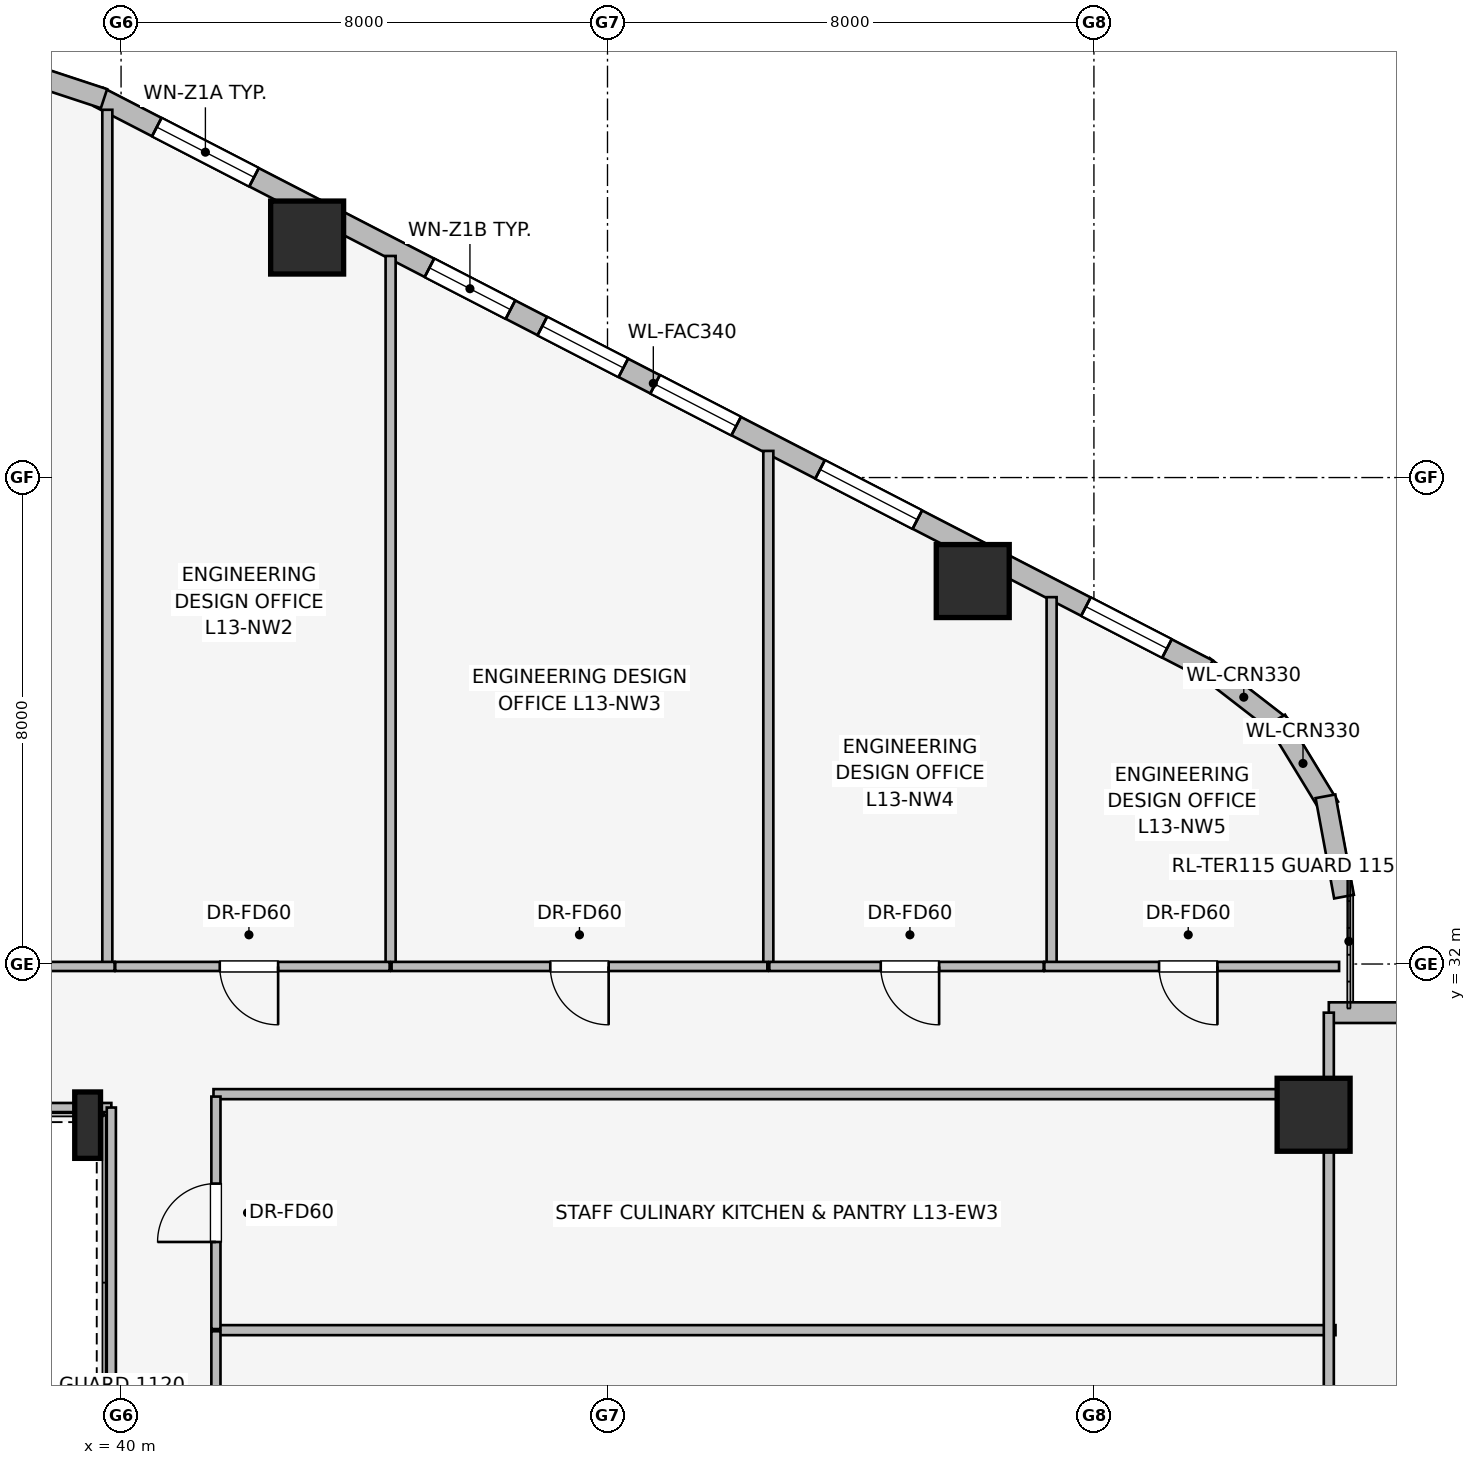
"""IFC4 building model, lengths in metres.
Left out: names, types, materials, properties, quantities, classifications, styles, units other than length and angle.
Written with IfcOpenShell. Run it as: python <this file> out.ifc"""

import sys

from ifc_helpers import new_model, si_unit, direction, frame, frame_2d, origin, origin_2d, place, context, subcontext, project, spatial, rectangle, i_section, extrude, element, fill, save


model = new_model("IFC4")
c1 = context("Model", 3, precision=1e-05, world=origin(), true_north=direction((0.0, 1.0)))
c2 = subcontext(c1, "Body", "Model", "MODEL_VIEW")
j1 = project(units=[si_unit("LENGTHUNIT", "METRE"), si_unit("PLANEANGLEUNIT", "RADIAN")], contexts=[c1])
p1 = place(None, origin())
s1 = spatial("IfcSite", under=j1, at=p1, CompositionType="ELEMENT")
p2 = place(p1, origin())
s2 = spatial("IfcBuilding", under=s1, at=p2, CompositionType="ELEMENT")
p3 = place(p2, frame((0.0, 0.0, 52.55)))
s3 = spatial("IfcBuildingStorey", under=s2, at=p3, CompositionType="ELEMENT", Elevation=52.55)
for number, where, z_axis, x_axis in (
    (1, (54.007, 38.298, 0.0), (0.0, 0.0, 1.0), (1.0, 0.0, 0.0)),
    (2, (43.06, 43.947, 0.0), (0.0, 0.0, 1.0), (1.0, 0.0, 0.0)),
    (3, (59.613, 29.521, 0.0), (0.0, 0.0, 1.0), (1.0, 0.0, 0.0)),
):
    element("IfcColumn", number, at=place(p3, frame(where, z_axis=z_axis, x_axis=x_axis)), inside=s3, PredefinedType="COLUMN", context=c2, shape_type="SweptSolid", body=[
        extrude(rectangle(XDim=1.2, YDim=1.2, at=origin_2d()), origin(), (0.0, 0.0, 1.0), 3.65),
    ])
p4 = place(p3, frame((39.45, 29.35, 0.0), z_axis=(0.0, 0.0, 1.0), x_axis=(1.0, 0.0, 0.0)))
e4 = element("IfcColumn", 4, at=p4, inside=s3, PredefinedType="COLUMN", context=c2, shape_type="SweptSolid", body=[
    extrude(i_section(OverallWidth=0.424, OverallDepth=1.092, WebThickness=0.045, FlangeThickness=0.082, at=origin_2d()), origin(), (0.0, 0.0, 1.0), 3.65),
])
p5 = place(p3, frame((57.802, 36.901, 0.0), z_axis=(0.0, 0.0, 1.0), x_axis=(0.790691856293, -0.61221433207, 0.0)))
e5 = element("IfcWall", 5, at=p5, inside=s3, PredefinedType="STANDARD", context=c2, shape_type="SweptSolid", body=[
    extrude(rectangle(XDim=1.676, YDim=0.33, at=frame_2d((0.838, 0.0))), origin(), (0.0, 0.0, 1.0), 3.36),
])
p6 = place(p3, frame((59.002, 36.015, 0.0), z_axis=(0.0, 0.0, 1.0), x_axis=(0.520584129191, -0.853810379671, 0.0)))
e6 = element("IfcWall", 6, at=p6, inside=s3, PredefinedType="STANDARD", context=c2, shape_type="SweptSolid", body=[
    extrude(rectangle(XDim=1.677, YDim=0.33, at=frame_2d((0.838, 0.0))), origin(), (0.0, 0.0, 1.0), 3.36),
])
p7 = place(p3, frame((59.808, 34.758, 0.0), z_axis=(0.0, 0.0, 1.0), x_axis=(0.181714143354, -0.983351397063, 0.0)))
e7 = element("IfcWall", 7, at=p7, inside=s3, PredefinedType="STANDARD", context=c2, shape_type="SweptSolid", body=[
    extrude(rectangle(XDim=1.678, YDim=0.33, at=frame_2d((0.839, 0.0))), origin(), (0.0, 0.0, 1.0), 3.36),
])
p8 = place(p3, frame((39.631, 46.257, 0.0), z_axis=(0.0, 0.0, 1.0), x_axis=(0.888634413993, -0.458616264721, 0.0)))
e8 = element("IfcWall", 8, at=p8, inside=s3, PredefinedType="STANDARD", context=c2, shape_type="SweptSolid", body=[
    extrude(rectangle(XDim=20.531, YDim=0.34, at=frame_2d((10.266, 0.0))), origin(), (0.0, 0.0, 1.0), 2.654),
])
p9 = place(p8, frame((1.076, 0.0, 0.75)))
e9 = element("IfcOpeningElement", 9, at=p9, cuts=e8, PredefinedType="OPENING", context=c2, shape_type="SweptSolid", body=[
    extrude(rectangle(XDim=1.8, YDim=1.5, at=frame_2d((0.9, 0.75))), frame((0.0, 0.18, 0.0), z_axis=(0.0, -1.0, 0.0), x_axis=(1.0, 0.0, 0.0)), (0.0, 0.0, 1.0), 0.36),
])
p10 = place(p8, frame((6.122, 0.0, 0.75)))
e10 = element("IfcOpeningElement", 10, at=p10, cuts=e8, PredefinedType="OPENING", context=c2, shape_type="SweptSolid", body=[
    extrude(rectangle(XDim=1.5, YDim=1.5, at=frame_2d((0.75, 0.75))), frame((0.0, 0.18, 0.0), z_axis=(0.0, -1.0, 0.0), x_axis=(1.0, 0.0, 0.0)), (0.0, 0.0, 1.0), 0.36),
])
p11 = place(p8, frame((8.211, 0.0, 0.75)))
e11 = element("IfcOpeningElement", 11, at=p11, cuts=e8, PredefinedType="OPENING", context=c2, shape_type="SweptSolid", body=[
    extrude(rectangle(XDim=1.5, YDim=1.5, at=frame_2d((0.75, 0.75))), frame((0.0, 0.18, 0.0), z_axis=(0.0, -1.0, 0.0), x_axis=(1.0, 0.0, 0.0)), (0.0, 0.0, 1.0), 0.36),
])
p12 = place(p8, frame((10.299, 0.0, 0.75)))
e12 = element("IfcOpeningElement", 12, at=p12, cuts=e8, PredefinedType="OPENING", context=c2, shape_type="SweptSolid", body=[
    extrude(rectangle(XDim=1.5, YDim=1.5, at=frame_2d((0.75, 0.75))), frame((0.0, 0.18, 0.0), z_axis=(0.0, -1.0, 0.0), x_axis=(1.0, 0.0, 0.0)), (0.0, 0.0, 1.0), 0.36),
])
p13 = place(p8, frame((13.352, 0.0, 0.75)))
e13 = element("IfcOpeningElement", 13, at=p13, cuts=e8, PredefinedType="OPENING", context=c2, shape_type="SweptSolid", body=[
    extrude(rectangle(XDim=1.8, YDim=1.5, at=frame_2d((0.9, 0.75))), frame((0.0, 0.18, 0.0), z_axis=(0.0, -1.0, 0.0), x_axis=(1.0, 0.0, 0.0)), (0.0, 0.0, 1.0), 0.36),
])
p14 = place(p8, frame((18.272, 0.0, 0.75)))
e14 = element("IfcOpeningElement", 14, at=p14, cuts=e8, PredefinedType="OPENING", context=c2, shape_type="SweptSolid", body=[
    extrude(rectangle(XDim=1.5, YDim=1.5, at=frame_2d((0.75, 0.75))), frame((0.0, 0.18, 0.0), z_axis=(0.0, -1.0, 0.0), x_axis=(1.0, 0.0, 0.0)), (0.0, 0.0, 1.0), 0.36),
])
p15 = place(p3, frame((38.083, 46.77, 0.0), z_axis=(0.0, 0.0, 1.0), x_axis=(0.94976901097, -0.312951794691, 0.0)))
e15 = element("IfcWall", 15, at=p15, inside=s3, PredefinedType="STANDARD", context=c2, shape_type="SweptSolid", body=[
    extrude(rectangle(XDim=1.722, YDim=0.33, at=frame_2d((0.861, 0.0))), origin(), (0.0, 0.0, 1.0), 3.36),
])
p16 = place(p3, frame((59.863, 31.2, 0.0), z_axis=(0.0, 0.0, 1.0), x_axis=(1.0, 0.0, 0.0)))
e16 = element("IfcWall", 16, at=p16, inside=s3, PredefinedType="STANDARD", context=c2, shape_type="SweptSolid", body=[
    extrude(rectangle(XDim=19.0, YDim=0.34, at=frame_2d((9.5, 0.0))), origin(), (0.0, 0.0, 1.0), 3.36),
])
p17 = place(p16, frame((2.633, 0.0, 0.75)))
e17 = element("IfcOpeningElement", 17, at=p17, cuts=e16, PredefinedType="OPENING", context=c2, shape_type="SweptSolid", body=[
    extrude(rectangle(XDim=1.8, YDim=1.5, at=frame_2d((0.9, 0.75))), frame((0.0, 0.18, 0.0), z_axis=(0.0, -1.0, 0.0), x_axis=(1.0, 0.0, 0.0)), (0.0, 0.0, 1.0), 0.36),
])
p18 = place(p16, frame((8.6, 0.0, 0.75)))
e18 = element("IfcOpeningElement", 18, at=p18, cuts=e16, PredefinedType="OPENING", context=c2, shape_type="SweptSolid", body=[
    extrude(rectangle(XDim=1.8, YDim=1.5, at=frame_2d((0.9, 0.75))), frame((0.0, 0.18, 0.0), z_axis=(0.0, -1.0, 0.0), x_axis=(1.0, 0.0, 0.0)), (0.0, 0.0, 1.0), 0.36),
])
p19 = place(p16, frame((14.567, 0.0, 0.75)))
e19 = element("IfcOpeningElement", 19, at=p19, cuts=e16, PredefinedType="OPENING", context=c2, shape_type="SweptSolid", body=[
    extrude(rectangle(XDim=1.8, YDim=1.5, at=frame_2d((0.9, 0.75))), frame((0.0, 0.18, 0.0), z_axis=(0.0, -1.0, 0.0), x_axis=(1.0, 0.0, 0.0)), (0.0, 0.0, 1.0), 0.36),
])
p20 = place(p3, frame((39.84, 29.64, 0.0), z_axis=(0.0, 0.0, 1.0), x_axis=(-1.0, 0.0, 0.0)))
e20 = element("IfcWall", 20, at=p20, inside=s3, PredefinedType="PARTITIONING", context=c2, shape_type="SweptSolid", body=[
    extrude(rectangle(XDim=12.2, YDim=0.15, at=frame_2d((6.1, 0.0))), origin(), (0.0, 0.0, 1.0), 2.501),
])
p21 = place(p3, frame((39.84, 18.36, 0.0), z_axis=(0.0, 0.0, 1.0), x_axis=(0.0, 1.0, 0.0)))
e21 = element("IfcWall", 21, at=p21, inside=s3, PredefinedType="PARTITIONING", context=c2, shape_type="SweptSolid", body=[
    extrude(rectangle(XDim=11.28, YDim=0.15, at=frame_2d((5.64, 0.0))), origin(), (0.0, 0.0, 1.0), 2.483),
])
p22 = place(p3, frame((39.774, 31.97, 0.0), z_axis=(0.0, 0.0, 1.0), x_axis=(0.0, 1.0, 0.0)))
e22 = element("IfcWall", 22, at=p22, inside=s3, PredefinedType="PARTITIONING", context=c2, shape_type="SweptSolid", body=[
    extrude(rectangle(XDim=14.078, YDim=0.165, at=frame_2d((7.039, 0.0))), origin(), (0.0, 0.0, 1.0), 2.483),
])
p23 = place(p3, frame((44.433, 31.97, 0.0), z_axis=(0.0, 0.0, 1.0), x_axis=(0.0, 1.0, 0.0)))
e23 = element("IfcWall", 23, at=p23, inside=s3, PredefinedType="PARTITIONING", context=c2, shape_type="SweptSolid", body=[
    extrude(rectangle(XDim=11.674, YDim=0.165, at=frame_2d((5.837, 0.0))), origin(), (0.0, 0.0, 1.0), 3.36),
])
p24 = place(p3, frame((50.645, 31.97, 0.0), z_axis=(0.0, 0.0, 1.0), x_axis=(0.0, 1.0, 0.0)))
e24 = element("IfcWall", 24, at=p24, inside=s3, PredefinedType="PARTITIONING", context=c2, shape_type="SweptSolid", body=[
    extrude(rectangle(XDim=8.468, YDim=0.165, at=frame_2d((4.234, 0.0))), origin(), (0.0, 0.0, 1.0), 3.36),
])
p25 = place(p3, frame((55.304, 31.97, 0.0), z_axis=(0.0, 0.0, 1.0), x_axis=(0.0, 1.0, 0.0)))
e25 = element("IfcWall", 25, at=p25, inside=s3, PredefinedType="PARTITIONING", context=c2, shape_type="SweptSolid", body=[
    extrude(rectangle(XDim=6.063, YDim=0.165, at=frame_2d((3.031, 0.0))), origin(), (0.0, 0.0, 1.0), 3.36),
])
p26 = place(p3, frame((39.894, 31.96, 0.0), z_axis=(0.0, 0.0, 1.0), x_axis=(-1.0, 0.0, 0.0)))
e26 = element("IfcWall", 26, at=p26, inside=s3, PredefinedType="PARTITIONING", context=c2, shape_type="SweptSolid", body=[
    extrude(rectangle(XDim=5.604, YDim=0.15, at=frame_2d((2.802, 0.0))), origin(), (0.0, 0.0, 1.0), 3.36),
])
p27 = place(p26, frame((2.265, 0.0, 0.0)))
e27 = element("IfcOpeningElement", 27, at=p27, cuts=e26, PredefinedType="OPENING", context=c2, shape_type="SweptSolid", body=[
    extrude(rectangle(XDim=0.96, YDim=2.0, at=frame_2d((0.48, 1.0))), frame((0.0, 0.085, 0.0), z_axis=(0.0, -1.0, 0.0), x_axis=(1.0, 0.0, 0.0)), (0.0, 0.0, 1.0), 0.17),
])
p28 = place(p3, frame((44.417, 31.96, 0.0), z_axis=(0.0, 0.0, 1.0), x_axis=(-1.0, 0.0, 0.0)))
e28 = element("IfcWall", 28, at=p28, inside=s3, PredefinedType="PARTITIONING", context=c2, shape_type="SweptSolid", body=[
    extrude(rectangle(XDim=4.513, YDim=0.15, at=frame_2d((2.256, 0.0))), origin(), (0.0, 0.0, 1.0), 3.36),
])
p29 = place(p28, frame((1.834, 0.0, 0.0)))
e29 = element("IfcOpeningElement", 29, at=p29, cuts=e28, PredefinedType="OPENING", context=c2, shape_type="SweptSolid", body=[
    extrude(rectangle(XDim=0.96, YDim=2.0, at=frame_2d((0.48, 1.0))), frame((0.0, 0.085, 0.0), z_axis=(0.0, -1.0, 0.0), x_axis=(1.0, 0.0, 0.0)), (0.0, 0.0, 1.0), 0.17),
])
p30 = place(p3, frame((50.629, 31.96, 0.0), z_axis=(0.0, 0.0, 1.0), x_axis=(-1.0, 0.0, 0.0)))
e30 = element("IfcWall", 30, at=p30, inside=s3, PredefinedType="PARTITIONING", context=c2, shape_type="SweptSolid", body=[
    extrude(rectangle(XDim=6.18, YDim=0.15, at=frame_2d((3.09, 0.0))), origin(), (0.0, 0.0, 1.0), 3.36),
])
p31 = place(p30, frame((2.61, 0.0, 0.0)))
e31 = element("IfcOpeningElement", 31, at=p31, cuts=e30, PredefinedType="OPENING", context=c2, shape_type="SweptSolid", body=[
    extrude(rectangle(XDim=0.96, YDim=2.0, at=frame_2d((0.48, 1.0))), frame((0.0, 0.085, 0.0), z_axis=(0.0, -1.0, 0.0), x_axis=(1.0, 0.0, 0.0)), (0.0, 0.0, 1.0), 0.17),
])
p32 = place(p3, frame((55.174, 31.96, 0.0), z_axis=(0.0, 0.0, 1.0), x_axis=(-1.0, 0.0, 0.0)))
e32 = element("IfcWall", 32, at=p32, inside=s3, PredefinedType="PARTITIONING", context=c2, shape_type="SweptSolid", body=[
    extrude(rectangle(XDim=4.513, YDim=0.15, at=frame_2d((2.257, 0.0))), origin(), (0.0, 0.0, 1.0), 3.36),
])
p33 = place(p32, frame((1.72, 0.0, 0.0)))
e33 = element("IfcOpeningElement", 33, at=p33, cuts=e32, PredefinedType="OPENING", context=c2, shape_type="SweptSolid", body=[
    extrude(rectangle(XDim=0.96, YDim=2.0, at=frame_2d((0.48, 1.0))), frame((0.0, 0.085, 0.0), z_axis=(0.0, -1.0, 0.0), x_axis=(1.0, 0.0, 0.0)), (0.0, 0.0, 1.0), 0.17),
])
p34 = place(p3, frame((60.032, 31.96, 0.0), z_axis=(0.0, 0.0, 1.0), x_axis=(-1.0, 0.0, 0.0)))
e34 = element("IfcWall", 34, at=p34, inside=s3, PredefinedType="PARTITIONING", context=c2, shape_type="SweptSolid", body=[
    extrude(rectangle(XDim=4.848, YDim=0.15, at=frame_2d((2.424, 0.0))), origin(), (0.0, 0.0, 1.0), 3.36),
])
p35 = place(p34, frame((2.001, 0.0, 0.0)))
e35 = element("IfcOpeningElement", 35, at=p35, cuts=e34, PredefinedType="OPENING", context=c2, shape_type="SweptSolid", body=[
    extrude(rectangle(XDim=0.96, YDim=2.0, at=frame_2d((0.48, 1.0))), frame((0.0, 0.085, 0.0), z_axis=(0.0, -1.0, 0.0), x_axis=(1.0, 0.0, 0.0)), (0.0, 0.0, 1.0), 0.17),
])
p36 = place(p3, frame((41.52, 29.86, 0.0), z_axis=(0.0, 0.0, 1.0), x_axis=(1.0, 0.0, 0.0)))
e36 = element("IfcWall", 36, at=p36, inside=s3, PredefinedType="PARTITIONING", context=c2, shape_type="SweptSolid", body=[
    extrude(rectangle(XDim=18.453, YDim=0.165, at=frame_2d((9.227, 0.0))), origin(), (0.0, 0.0, 1.0), 2.483),
])
p37 = place(p3, frame((41.59, 25.979, 0.0), z_axis=(0.0, 0.0, 1.0), x_axis=(1.0, 0.0, 0.0)))
e37 = element("IfcWall", 37, at=p37, inside=s3, PredefinedType="PARTITIONING", context=c2, shape_type="SweptSolid", body=[
    extrude(rectangle(XDim=18.383, YDim=0.165, at=frame_2d((9.191, 0.0))), origin(), (0.0, 0.0, 1.0), 3.36),
])
p38 = place(p3, frame((41.56, 22.039, 0.0), z_axis=(0.0, 0.0, 1.0), x_axis=(0.0, 1.0, 0.0)))
e38 = element("IfcWall", 38, at=p38, inside=s3, PredefinedType="PARTITIONING", context=c2, shape_type="SweptSolid", body=[
    extrude(rectangle(XDim=3.922, YDim=0.15, at=frame_2d((1.961, 0.0))), origin(), (0.0, 0.0, 1.0), 3.36),
])
p39 = place(p38, frame((1.481, 0.0, 0.0)))
e39 = element("IfcOpeningElement", 39, at=p39, cuts=e38, PredefinedType="OPENING", context=c2, shape_type="SweptSolid", body=[
    extrude(rectangle(XDim=0.96, YDim=2.0, at=frame_2d((0.48, 1.0))), frame((0.0, 0.085, 0.0), z_axis=(0.0, -1.0, 0.0), x_axis=(1.0, 0.0, 0.0)), (0.0, 0.0, 1.0), 0.17),
])
p40 = place(p3, frame((41.56, 25.997, 0.0), z_axis=(0.0, 0.0, 1.0), x_axis=(0.0, 1.0, 0.0)))
e40 = element("IfcWall", 40, at=p40, inside=s3, PredefinedType="PARTITIONING", context=c2, shape_type="SweptSolid", body=[
    extrude(rectangle(XDim=3.823, YDim=0.15, at=frame_2d((1.912, 0.0))), origin(), (0.0, 0.0, 1.0), 3.36),
])
p41 = place(p40, frame((1.432, 0.0, 0.0)))
e41 = element("IfcOpeningElement", 41, at=p41, cuts=e40, PredefinedType="OPENING", context=c2, shape_type="SweptSolid", body=[
    extrude(rectangle(XDim=0.96, YDim=2.0, at=frame_2d((0.48, 1.0))), frame((0.0, 0.085, 0.0), z_axis=(0.0, -1.0, 0.0), x_axis=(1.0, 0.0, 0.0)), (0.0, 0.0, 1.0), 0.17),
])
p42 = place(p3, frame((59.863, 16.8, 0.0), z_axis=(0.0, 0.0, 1.0), x_axis=(0.0, 1.0, 0.0)))
e42 = element("IfcWall", 42, at=p42, inside=s3, PredefinedType="PARTITIONING", context=c2, shape_type="SweptSolid", body=[
    extrude(rectangle(XDim=14.4, YDim=0.165, at=frame_2d((7.2, 0.0))), origin(), (0.0, 0.0, 1.0), 2.654),
])
p43 = place(p42, frame((2.45, 0.0, 0.0)))
e43 = element("IfcOpeningElement", 43, at=p43, cuts=e42, PredefinedType="OPENING", context=c2, shape_type="SweptSolid", body=[
    extrude(rectangle(XDim=0.96, YDim=2.0, at=frame_2d((0.48, 1.0))), frame((0.0, 0.093, 0.0), z_axis=(0.0, -1.0, 0.0), x_axis=(1.0, 0.0, 0.0)), (0.0, 0.0, 1.0), 0.185),
])
p44 = place(p9, origin())
e44 = element("IfcWindow", 44, at=p44, inside=s3, PartitioningType="SINGLE_PANEL", PredefinedType="WINDOW", context=c2, shape_type="SweptSolid", body=[
    extrude(rectangle(XDim=1.8, YDim=1.5, at=frame_2d((0.9, 0.75))), frame((0.0, 0.03, 0.0), z_axis=(0.0, -1.0, 0.0), x_axis=(1.0, 0.0, 0.0)), (0.0, 0.0, 1.0), 0.06),
])
fill(e9, e44)
p45 = place(p10, origin())
e45 = element("IfcWindow", 45, at=p45, inside=s3, PartitioningType="SINGLE_PANEL", PredefinedType="WINDOW", context=c2, shape_type="SweptSolid", body=[
    extrude(rectangle(XDim=1.5, YDim=1.5, at=frame_2d((0.75, 0.75))), frame((0.0, 0.03, 0.0), z_axis=(0.0, -1.0, 0.0), x_axis=(1.0, 0.0, 0.0)), (0.0, 0.0, 1.0), 0.06),
])
fill(e10, e45)
p46 = place(p11, origin())
e46 = element("IfcWindow", 46, at=p46, inside=s3, PartitioningType="SINGLE_PANEL", PredefinedType="WINDOW", context=c2, shape_type="SweptSolid", body=[
    extrude(rectangle(XDim=1.5, YDim=1.5, at=frame_2d((0.75, 0.75))), frame((0.0, 0.03, 0.0), z_axis=(0.0, -1.0, 0.0), x_axis=(1.0, 0.0, 0.0)), (0.0, 0.0, 1.0), 0.06),
])
fill(e11, e46)
p47 = place(p12, origin())
e47 = element("IfcWindow", 47, at=p47, inside=s3, PartitioningType="SINGLE_PANEL", PredefinedType="WINDOW", context=c2, shape_type="SweptSolid", body=[
    extrude(rectangle(XDim=1.5, YDim=1.5, at=frame_2d((0.75, 0.75))), frame((0.0, 0.03, 0.0), z_axis=(0.0, -1.0, 0.0), x_axis=(1.0, 0.0, 0.0)), (0.0, 0.0, 1.0), 0.06),
])
fill(e12, e47)
p48 = place(p13, origin())
e48 = element("IfcWindow", 48, at=p48, inside=s3, PartitioningType="SINGLE_PANEL", PredefinedType="WINDOW", context=c2, shape_type="SweptSolid", body=[
    extrude(rectangle(XDim=1.8, YDim=1.5, at=frame_2d((0.9, 0.75))), frame((0.0, 0.03, 0.0), z_axis=(0.0, -1.0, 0.0), x_axis=(1.0, 0.0, 0.0)), (0.0, 0.0, 1.0), 0.06),
])
fill(e13, e48)
p49 = place(p14, origin())
e49 = element("IfcWindow", 49, at=p49, inside=s3, PartitioningType="SINGLE_PANEL", PredefinedType="WINDOW", context=c2, shape_type="SweptSolid", body=[
    extrude(rectangle(XDim=1.5, YDim=1.5, at=frame_2d((0.75, 0.75))), frame((0.0, 0.03, 0.0), z_axis=(0.0, -1.0, 0.0), x_axis=(1.0, 0.0, 0.0)), (0.0, 0.0, 1.0), 0.06),
])
fill(e14, e49)
p50 = place(p29, origin())
e50 = element("IfcDoor", 50, at=p50, inside=s3, OperationType="SINGLE_SWING_LEFT", PredefinedType="DOOR", context=c2, shape_type="SweptSolid", body=[
    extrude(rectangle(XDim=0.96, YDim=2.0, at=frame_2d((0.48, 1.0))), frame((0.0, 0.025, 0.0), z_axis=(0.0, -1.0, 0.0), x_axis=(1.0, 0.0, 0.0)), (0.0, 0.0, 1.0), 0.05),
])
fill(e29, e50)
p51 = place(p31, origin())
e51 = element("IfcDoor", 51, at=p51, inside=s3, OperationType="SINGLE_SWING_LEFT", PredefinedType="DOOR", context=c2, shape_type="SweptSolid", body=[
    extrude(rectangle(XDim=0.96, YDim=2.0, at=frame_2d((0.48, 1.0))), frame((0.0, 0.025, 0.0), z_axis=(0.0, -1.0, 0.0), x_axis=(1.0, 0.0, 0.0)), (0.0, 0.0, 1.0), 0.05),
])
fill(e31, e51)
p52 = place(p33, origin())
e52 = element("IfcDoor", 52, at=p52, inside=s3, OperationType="SINGLE_SWING_LEFT", PredefinedType="DOOR", context=c2, shape_type="SweptSolid", body=[
    extrude(rectangle(XDim=0.96, YDim=2.0, at=frame_2d((0.48, 1.0))), frame((0.0, 0.025, 0.0), z_axis=(0.0, -1.0, 0.0), x_axis=(1.0, 0.0, 0.0)), (0.0, 0.0, 1.0), 0.05),
])
fill(e33, e52)
p53 = place(p35, origin())
e53 = element("IfcDoor", 53, at=p53, inside=s3, OperationType="SINGLE_SWING_LEFT", PredefinedType="DOOR", context=c2, shape_type="SweptSolid", body=[
    extrude(rectangle(XDim=0.96, YDim=2.0, at=frame_2d((0.48, 1.0))), frame((0.0, 0.025, 0.0), z_axis=(0.0, -1.0, 0.0), x_axis=(1.0, 0.0, 0.0)), (0.0, 0.0, 1.0), 0.05),
])
fill(e35, e53)
p54 = place(p41, origin())
e54 = element("IfcDoor", 54, at=p54, inside=s3, OperationType="SINGLE_SWING_LEFT", PredefinedType="DOOR", context=c2, shape_type="SweptSolid", body=[
    extrude(rectangle(XDim=0.96, YDim=2.0, at=frame_2d((0.48, 1.0))), frame((0.0, 0.025, 0.0), z_axis=(0.0, -1.0, 0.0), x_axis=(1.0, 0.0, 0.0)), (0.0, 0.0, 1.0), 0.05),
])
fill(e41, e54)
save(model, sys.argv[1])
